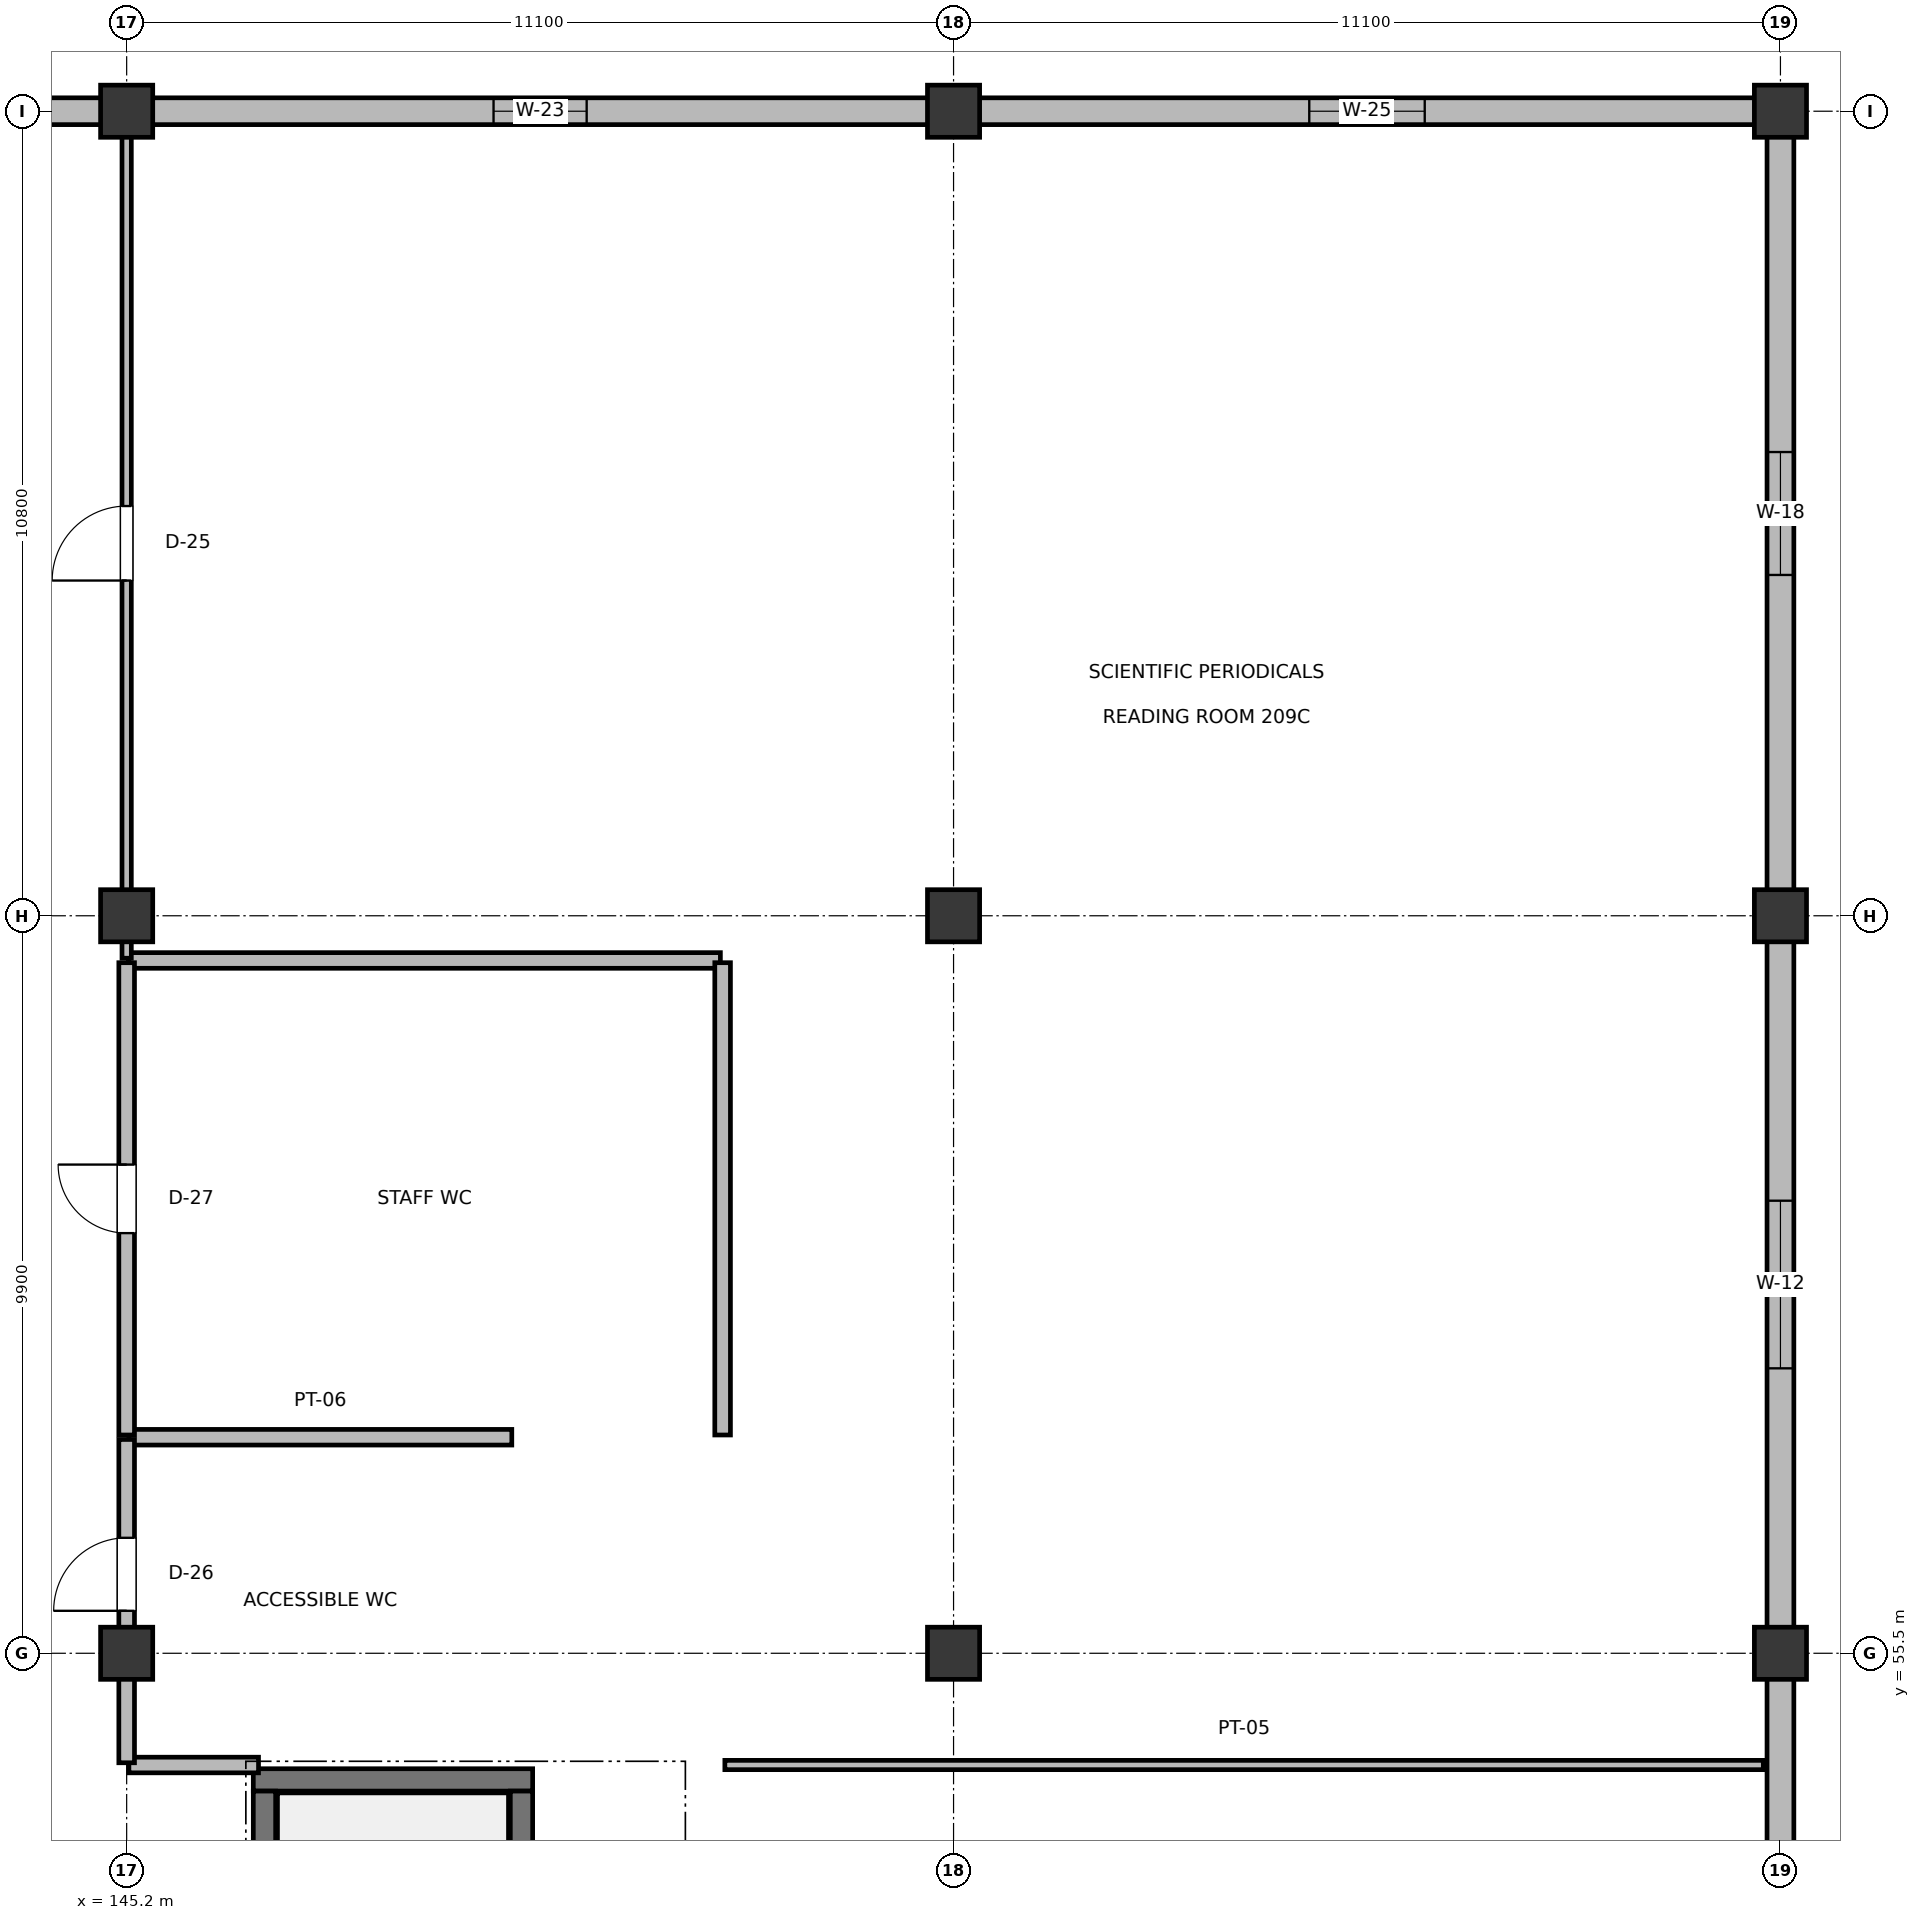
"""IFC4 building model, lengths in metres.
Left out: names, types, materials, properties, quantities, classifications, styles, units other than length and angle.
Written with IfcOpenShell. Run it as: python <this file> out.ifc"""

import sys

from ifc_helpers import new_model, si_unit, direction, frame, frame_2d, origin, origin_2d, place, context, subcontext, project, spatial, rectangle, extrude, element, fill, save


model = new_model("IFC4")
c1 = context("Model", 3, precision=1e-05, world=origin(), true_north=direction((0.0, 1.0)))
c2 = subcontext(c1, "Body", "Model", "MODEL_VIEW")
j1 = project(units=[si_unit("LENGTHUNIT", "METRE"), si_unit("PLANEANGLEUNIT", "RADIAN")], contexts=[c1])
p1 = place(None, origin())
s1 = spatial("IfcSite", under=j1, at=p1, CompositionType="ELEMENT")
p2 = place(p1, origin())
s2 = spatial("IfcBuilding", under=s1, at=p2, CompositionType="ELEMENT")
p3 = place(p2, frame((0.0, 0.0, 10.2)))
s3 = spatial("IfcBuildingStorey", under=s2, at=p3, CompositionType="ELEMENT", Elevation=10.2)
for number, where, z_axis, x_axis in (
    (1, (145.2, 55.5, 0.0), (0.0, 0.0, 1.0), (1.0, 0.0, 0.0)),
    (2, (145.2, 65.4, 0.0), (0.0, 0.0, 1.0), (1.0, 0.0, 0.0)),
    (3, (145.2, 76.2, 0.0), (0.0, 0.0, 1.0), (1.0, 0.0, 0.0)),
    (4, (156.3, 55.5, 0.0), (0.0, 0.0, 1.0), (1.0, 0.0, 0.0)),
    (5, (156.3, 65.4, 0.0), (0.0, 0.0, 1.0), (1.0, 0.0, 0.0)),
    (6, (156.3, 76.2, 0.0), (0.0, 0.0, 1.0), (1.0, 0.0, 0.0)),
    (7, (167.4, 55.5, 0.0), (0.0, 0.0, 1.0), (1.0, 0.0, 0.0)),
    (8, (167.4, 65.4, 0.0), (0.0, 0.0, 1.0), (1.0, 0.0, 0.0)),
    (9, (167.4, 76.2, 0.0), (0.0, 0.0, 1.0), (1.0, 0.0, 0.0)),
):
    element("IfcColumn", number, at=place(p3, frame(where, z_axis=z_axis, x_axis=x_axis)), inside=s3, PredefinedType="COLUMN", context=c2, shape_type="SweptSolid", body=[
        extrude(rectangle(XDim=0.7, YDim=0.7, at=origin_2d()), origin(), (0.0, 0.0, 1.0), 4.8),
    ])
p4 = place(p3, frame((167.4, 45.935, 0.0), z_axis=(0.0, 0.0, 1.0), x_axis=(0.0, 1.0, 0.0)))
e10 = element("IfcWall", 10, at=p4, inside=s3, PredefinedType="SOLIDWALL", context=c2, shape_type="SweptSolid", body=[
    extrude(rectangle(XDim=9.23, YDim=0.36, at=frame_2d((4.615, 0.0))), origin(), (0.0, 0.0, 1.0), 3.815),
])
p5 = place(p4, frame((3.715, 0.0, 0.85)))
e11 = element("IfcOpeningElement", 11, at=p5, cuts=e10, PredefinedType="OPENING", context=c2, shape_type="SweptSolid", body=[
    extrude(rectangle(XDim=1.8, YDim=1.75, at=frame_2d((0.9, 0.875))), frame((0.0, 0.19, 0.0), z_axis=(0.0, -1.0, 0.0), x_axis=(1.0, 0.0, 0.0)), (0.0, 0.0, 1.0), 0.38),
])
p6 = place(p3, frame((167.4, 55.835, 0.0), z_axis=(0.0, 0.0, 1.0), x_axis=(0.0, 1.0, 0.0)))
e12 = element("IfcWall", 12, at=p6, inside=s3, PredefinedType="SOLIDWALL", context=c2, shape_type="SweptSolid", body=[
    extrude(rectangle(XDim=9.23, YDim=0.36, at=frame_2d((4.615, 0.0))), origin(), (0.0, 0.0, 1.0), 3.815),
])
p7 = place(p6, frame((3.49, 0.0, 0.85)))
e13 = element("IfcOpeningElement", 13, at=p7, cuts=e12, PredefinedType="OPENING", context=c2, shape_type="SweptSolid", body=[
    extrude(rectangle(XDim=2.25, YDim=1.85, at=frame_2d((1.125, 0.925))), frame((0.0, 0.19, 0.0), z_axis=(0.0, -1.0, 0.0), x_axis=(1.0, 0.0, 0.0)), (0.0, 0.0, 1.0), 0.38),
])
p8 = place(p3, frame((167.4, 65.735, 0.0), z_axis=(0.0, 0.0, 1.0), x_axis=(0.0, 1.0, 0.0)))
e14 = element("IfcWall", 14, at=p8, inside=s3, PredefinedType="SOLIDWALL", context=c2, shape_type="SweptSolid", body=[
    extrude(rectangle(XDim=10.13, YDim=0.36, at=frame_2d((5.065, 0.0))), origin(), (0.0, 0.0, 1.0), 3.815),
])
p9 = place(p8, frame((4.24, 0.0, 0.85)))
e15 = element("IfcOpeningElement", 15, at=p9, cuts=e14, PredefinedType="OPENING", context=c2, shape_type="SweptSolid", body=[
    extrude(rectangle(XDim=1.65, YDim=1.65, at=frame_2d((0.825, 0.825))), frame((0.0, 0.19, 0.0), z_axis=(0.0, -1.0, 0.0), x_axis=(1.0, 0.0, 0.0)), (0.0, 0.0, 1.0), 0.38),
])
p10 = place(p3, frame((134.135, 76.2, 0.0), z_axis=(0.0, 0.0, 1.0), x_axis=(1.0, 0.0, 0.0)))
e16 = element("IfcWall", 16, at=p10, inside=s3, PredefinedType="SOLIDWALL", context=c2, shape_type="SweptSolid", body=[
    extrude(rectangle(XDim=10.73, YDim=0.36, at=frame_2d((5.365, 0.0))), origin(), (0.0, 0.0, 1.0), 3.555),
])
p11 = place(p10, frame((4.89, 0.0, 0.85)))
e17 = element("IfcOpeningElement", 17, at=p11, cuts=e16, PredefinedType="OPENING", context=c2, shape_type="SweptSolid", body=[
    extrude(rectangle(XDim=0.95, YDim=1.7, at=frame_2d((0.475, 0.85))), frame((0.0, 0.19, 0.0), z_axis=(0.0, -1.0, 0.0), x_axis=(1.0, 0.0, 0.0)), (0.0, 0.0, 1.0), 0.38),
])
p12 = place(p3, frame((145.535, 76.2, 0.0), z_axis=(0.0, 0.0, 1.0), x_axis=(1.0, 0.0, 0.0)))
e18 = element("IfcWall", 18, at=p12, inside=s3, PredefinedType="SOLIDWALL", context=c2, shape_type="SweptSolid", body=[
    extrude(rectangle(XDim=10.43, YDim=0.36, at=frame_2d((5.215, 0.0))), origin(), (0.0, 0.0, 1.0), 3.715),
])
p13 = place(p12, frame((4.59, 0.0, 0.85)))
e19 = element("IfcOpeningElement", 19, at=p13, cuts=e18, PredefinedType="OPENING", context=c2, shape_type="SweptSolid", body=[
    extrude(rectangle(XDim=1.25, YDim=1.8, at=frame_2d((0.625, 0.9))), frame((0.0, 0.19, 0.0), z_axis=(0.0, -1.0, 0.0), x_axis=(1.0, 0.0, 0.0)), (0.0, 0.0, 1.0), 0.38),
])
p14 = place(p3, frame((156.635, 76.2, 0.0), z_axis=(0.0, 0.0, 1.0), x_axis=(1.0, 0.0, 0.0)))
e20 = element("IfcWall", 20, at=p14, inside=s3, PredefinedType="SOLIDWALL", context=c2, shape_type="SweptSolid", body=[
    extrude(rectangle(XDim=10.43, YDim=0.36, at=frame_2d((5.215, 0.0))), origin(), (0.0, 0.0, 1.0), 3.535),
])
p15 = place(p14, frame((4.44, 0.0, 0.85)))
e21 = element("IfcOpeningElement", 21, at=p15, cuts=e20, PredefinedType="OPENING", context=c2, shape_type="SweptSolid", body=[
    extrude(rectangle(XDim=1.55, YDim=2.0, at=frame_2d((0.775, 1.0))), frame((0.0, 0.19, 0.0), z_axis=(0.0, -1.0, 0.0), x_axis=(1.0, 0.0, 0.0)), (0.0, 0.0, 1.0), 0.38),
])
p16 = place(p3, frame((146.9, 53.8, 0.0), z_axis=(0.0, 0.0, 1.0), x_axis=(1.0, 0.0, 0.0)))
e22 = element("IfcWall", 22, at=p16, inside=s3, PredefinedType="SHEAR", context=c2, shape_type="SweptSolid", body=[
    extrude(rectangle(XDim=3.75, YDim=0.3, at=frame_2d((1.875, 0.0))), origin(), (0.0, 0.0, 1.0), 4.58),
])
for number, where, z_axis, x_axis in (
    (23, (147.05, 46.6, 0.0), (0.0, 0.0, 1.0), (0.0, 1.0, 0.0)),
    (24, (150.5, 46.6, 0.0), (0.0, 0.0, 1.0), (0.0, 1.0, 0.0)),
):
    element("IfcWall", number, at=place(p3, frame(where, z_axis=z_axis, x_axis=x_axis)), inside=s3, PredefinedType="SHEAR", context=c2, shape_type="SweptSolid", body=[
        extrude(rectangle(XDim=7.05, YDim=0.3, at=frame_2d((3.525, 0.0))), origin(), (0.0, 0.0, 1.0), 4.58),
    ])
p17 = place(p3, frame((153.23, 54.0, 0.0), z_axis=(0.0, 0.0, 1.0), x_axis=(1.0, 0.0, 0.0)))
e25 = element("IfcWall", 25, at=p17, inside=s3, PredefinedType="PARTITIONING", context=c2, shape_type="SweptSolid", body=[
    extrude(rectangle(XDim=13.94, YDim=0.125, at=frame_2d((6.97, 0.0))), origin(), (0.0, 0.0, 1.0), 3.665),
])
p18 = place(p3, frame((145.23, 58.4, 0.0), z_axis=(0.0, 0.0, 1.0), x_axis=(1.0, 0.0, 0.0)))
e26 = element("IfcWall", 26, at=p18, inside=s3, PredefinedType="PLUMBINGWALL", context=c2, shape_type="SweptSolid", body=[
    extrude(rectangle(XDim=5.14, YDim=0.21, at=frame_2d((2.57, 0.0))), origin(), (0.0, 0.0, 1.0), 3.665),
])
p19 = place(p3, frame((145.23, 54.0, 0.0), z_axis=(0.0, 0.0, 1.0), x_axis=(1.0, 0.0, 0.0)))
e27 = element("IfcWall", 27, at=p19, inside=s3, PredefinedType="PLUMBINGWALL", context=c2, shape_type="SweptSolid", body=[
    extrude(rectangle(XDim=1.74, YDim=0.21, at=frame_2d((0.87, 0.0))), origin(), (0.0, 0.0, 1.0), 3.665),
])
p20 = place(p3, frame((145.2, 54.03, 0.0), z_axis=(0.0, 0.0, 1.0), x_axis=(0.0, 1.0, 0.0)))
e28 = element("IfcWall", 28, at=p20, inside=s3, PredefinedType="PLUMBINGWALL", context=c2, shape_type="SweptSolid", body=[
    extrude(rectangle(XDim=4.34, YDim=0.21, at=frame_2d((2.17, 0.0))), origin(), (0.0, 0.0, 1.0), 3.665),
])
p21 = place(p20, frame((2.04, 0.0, 0.0)))
e29 = element("IfcOpeningElement", 29, at=p21, cuts=e28, PredefinedType="OPENING", context=c2, shape_type="SweptSolid", body=[
    extrude(rectangle(XDim=0.98, YDim=2.1, at=frame_2d((0.49, 1.05))), frame((0.0, 0.115, 0.0), z_axis=(0.0, -1.0, 0.0), x_axis=(1.0, 0.0, 0.0)), (0.0, 0.0, 1.0), 0.23),
])
p22 = place(p3, frame((145.23, 64.8, 0.0), z_axis=(0.0, 0.0, 1.0), x_axis=(1.0, 0.0, 0.0)))
e30 = element("IfcWall", 30, at=p22, inside=s3, PredefinedType="PLUMBINGWALL", context=c2, shape_type="SweptSolid", body=[
    extrude(rectangle(XDim=7.94, YDim=0.21, at=frame_2d((3.97, 0.0))), origin(), (0.0, 0.0, 1.0), 3.665),
])
p23 = place(p3, frame((153.2, 58.43, 0.0), z_axis=(0.0, 0.0, 1.0), x_axis=(0.0, 1.0, 0.0)))
e31 = element("IfcWall", 31, at=p23, inside=s3, PredefinedType="PLUMBINGWALL", context=c2, shape_type="SweptSolid", body=[
    extrude(rectangle(XDim=6.34, YDim=0.21, at=frame_2d((3.17, 0.0))), origin(), (0.0, 0.0, 1.0), 4.48),
])
p24 = place(p3, frame((145.2, 58.43, 0.0), z_axis=(0.0, 0.0, 1.0), x_axis=(0.0, 1.0, 0.0)))
e32 = element("IfcWall", 32, at=p24, inside=s3, PredefinedType="PLUMBINGWALL", context=c2, shape_type="SweptSolid", body=[
    extrude(rectangle(XDim=6.34, YDim=0.21, at=frame_2d((3.17, 0.0))), origin(), (0.0, 0.0, 1.0), 3.665),
])
p25 = place(p24, frame((2.71, 0.0, 0.0)))
e33 = element("IfcOpeningElement", 33, at=p25, cuts=e32, PredefinedType="OPENING", context=c2, shape_type="SweptSolid", body=[
    extrude(rectangle(XDim=0.92, YDim=2.1, at=frame_2d((0.46, 1.05))), frame((0.0, 0.115, 0.0), z_axis=(0.0, -1.0, 0.0), x_axis=(1.0, 0.0, 0.0)), (0.0, 0.0, 1.0), 0.23),
])
p26 = place(p3, frame((145.2, 64.83, 0.0), z_axis=(0.0, 0.0, 1.0), x_axis=(0.0, 1.0, 0.0)))
e34 = element("IfcWall", 34, at=p26, inside=s3, PredefinedType="PARTITIONING", context=c2, shape_type="SweptSolid", body=[
    extrude(rectangle(XDim=11.14, YDim=0.125, at=frame_2d((5.57, 0.0))), origin(), (0.0, 0.0, 1.0), 3.665),
])
p27 = place(p26, frame((5.07, 0.0, 0.0)))
e35 = element("IfcOpeningElement", 35, at=p27, cuts=e34, PredefinedType="OPENING", context=c2, shape_type="SweptSolid", body=[
    extrude(rectangle(XDim=1.0, YDim=2.15, at=frame_2d((0.5, 1.075))), frame((0.0, 0.073, 0.0), z_axis=(0.0, -1.0, 0.0), x_axis=(1.0, 0.0, 0.0)), (0.0, 0.0, 1.0), 0.145),
])
p28 = place(p7, frame((2.25, 0.0, 0.0), z_axis=(0.0, 0.0, 1.0), x_axis=(-1.0, 0.0, 0.0)))
e36 = element("IfcWindow", 36, at=p28, inside=s3, PartitioningType="DOUBLE_PANEL_VERTICAL", PredefinedType="WINDOW", context=c2, shape_type="SweptSolid", body=[
    extrude(rectangle(XDim=2.25, YDim=1.85, at=frame_2d((1.125, 0.925))), frame((0.0, 0.03, 0.0), z_axis=(0.0, -1.0, 0.0), x_axis=(1.0, 0.0, 0.0)), (0.0, 0.0, 1.0), 0.06),
])
fill(e13, e36)
p29 = place(p9, frame((1.65, 0.0, 0.0), z_axis=(0.0, 0.0, 1.0), x_axis=(-1.0, 0.0, 0.0)))
e37 = element("IfcWindow", 37, at=p29, inside=s3, PartitioningType="SINGLE_PANEL", PredefinedType="WINDOW", context=c2, shape_type="SweptSolid", body=[
    extrude(rectangle(XDim=1.65, YDim=1.65, at=frame_2d((0.825, 0.825))), frame((0.0, 0.03, 0.0), z_axis=(0.0, -1.0, 0.0), x_axis=(1.0, 0.0, 0.0)), (0.0, 0.0, 1.0), 0.06),
])
fill(e15, e37)
p30 = place(p13, origin())
e38 = element("IfcWindow", 38, at=p30, inside=s3, PartitioningType="DOUBLE_PANEL_VERTICAL", PredefinedType="WINDOW", context=c2, shape_type="SweptSolid", body=[
    extrude(rectangle(XDim=1.25, YDim=1.8, at=frame_2d((0.625, 0.9))), frame((0.0, 0.03, 0.0), z_axis=(0.0, -1.0, 0.0), x_axis=(1.0, 0.0, 0.0)), (0.0, 0.0, 1.0), 0.06),
])
fill(e19, e38)
p31 = place(p15, origin())
e39 = element("IfcWindow", 39, at=p31, inside=s3, PartitioningType="DOUBLE_PANEL_VERTICAL", PredefinedType="WINDOW", context=c2, shape_type="SweptSolid", body=[
    extrude(rectangle(XDim=1.55, YDim=2.0, at=frame_2d((0.775, 1.0))), frame((0.0, 0.03, 0.0), z_axis=(0.0, -1.0, 0.0), x_axis=(1.0, 0.0, 0.0)), (0.0, 0.0, 1.0), 0.06),
])
fill(e21, e39)
p32 = place(p21, origin())
e40 = element("IfcDoor", 40, at=p32, inside=s3, OperationType="SINGLE_SWING_LEFT", PredefinedType="DOOR", context=c2, shape_type="SweptSolid", body=[
    extrude(rectangle(XDim=0.98, YDim=2.1, at=frame_2d((0.49, 1.05))), frame((0.0, 0.025, 0.0), z_axis=(0.0, -1.0, 0.0), x_axis=(1.0, 0.0, 0.0)), (0.0, 0.0, 1.0), 0.05),
])
fill(e29, e40)
p33 = place(p25, origin())
e41 = element("IfcDoor", 41, at=p33, inside=s3, OperationType="SINGLE_SWING_RIGHT", PredefinedType="DOOR", context=c2, shape_type="SweptSolid", body=[
    extrude(rectangle(XDim=0.92, YDim=2.1, at=frame_2d((0.46, 1.05))), frame((0.0, 0.025, 0.0), z_axis=(0.0, -1.0, 0.0), x_axis=(1.0, 0.0, 0.0)), (0.0, 0.0, 1.0), 0.05),
])
fill(e33, e41)
p34 = place(p27, origin())
e42 = element("IfcDoor", 42, at=p34, inside=s3, OperationType="SINGLE_SWING_LEFT", PredefinedType="DOOR", context=c2, shape_type="SweptSolid", body=[
    extrude(rectangle(XDim=1.0, YDim=2.15, at=frame_2d((0.5, 1.075))), frame((0.0, 0.025, 0.0), z_axis=(0.0, -1.0, 0.0), x_axis=(1.0, 0.0, 0.0)), (0.0, 0.0, 1.0), 0.05),
])
fill(e35, e42)
save(model, sys.argv[1])
